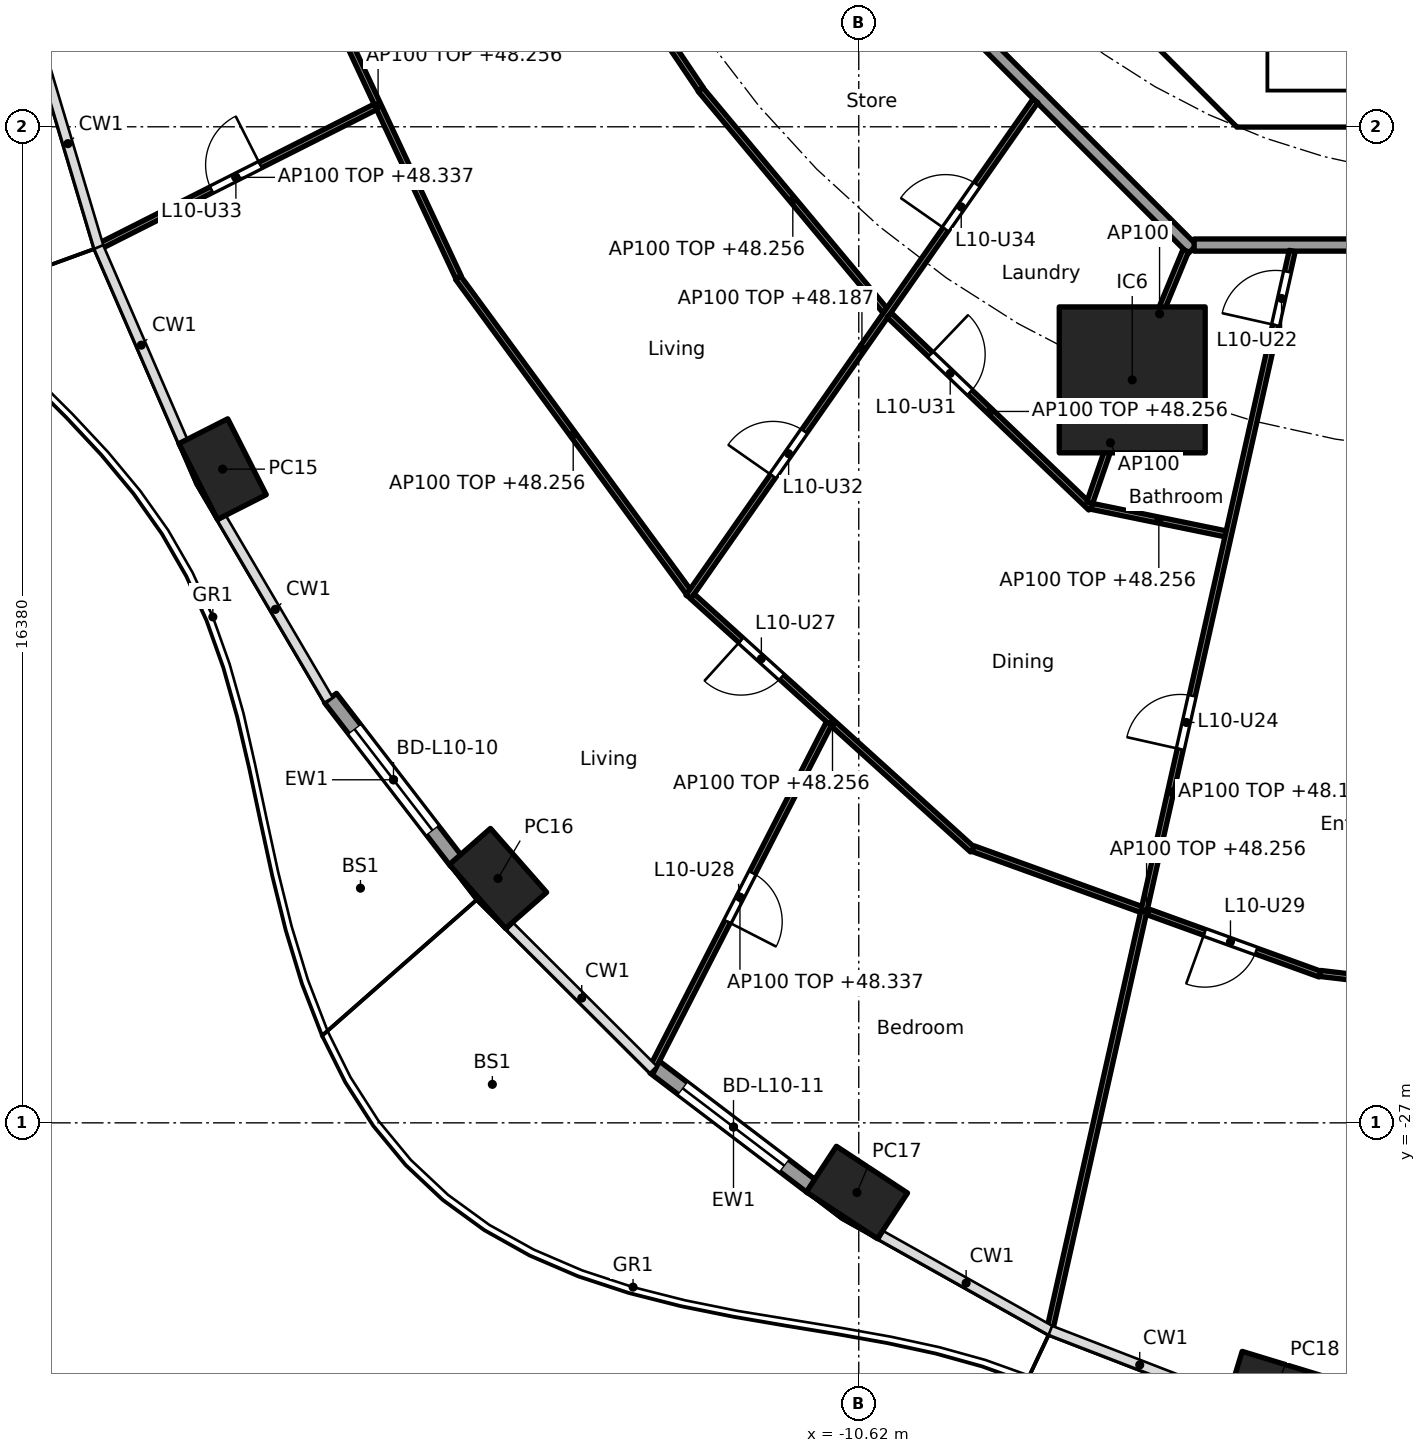
"""IFC4 building model, lengths in metres.
Left out: names, types, materials, properties, quantities, classifications, styles, units other than length and angle.
Written with IfcOpenShell. Run it as: python <this file> out.ifc"""

import sys

from ifc_helpers import new_model, si_unit, direction, frame, frame_2d, origin, origin_2d, place, context, subcontext, project, spatial, polyline, rectangle, hollow_rectangle, outline, extrude, element, fill, save


model = new_model("IFC4")
c1 = context("Model", 3, precision=1e-05, world=origin(), true_north=direction((0.0, 1.0)))
c2 = subcontext(c1, "Body", "Model", "MODEL_VIEW")
j1 = project(units=[si_unit("LENGTHUNIT", "METRE"), si_unit("PLANEANGLEUNIT", "RADIAN")], contexts=[c1])
p1 = place(None, origin())
s1 = spatial("IfcSite", under=j1, at=p1, CompositionType="ELEMENT")
p2 = place(p1, origin())
s2 = spatial("IfcBuilding", under=s1, at=p2, CompositionType="ELEMENT")
p3 = place(p2, frame((0.0, 0.0, 45.5)))
s3 = spatial("IfcBuildingStorey", under=s2, at=p3, CompositionType="ELEMENT", Elevation=45.5)
for number, where, z_axis, x_axis in (
    (1, (-21.082, -16.25, 0.0), (0.0, 0.0, 1.0), (0.452, -0.892, 0.0)),
    (2, (-16.552, -22.981, 0.0), (0.0, 0.0, 1.0), (0.66, -0.751, 0.0)),
    (3, (-10.65, -28.146, 0.0), (0.0, 0.0, 1.0), (0.836, -0.549, 0.0)),
    (4, (-3.776, -31.393, 0.0), (0.0, 0.0, 1.0), (0.957, -0.292, 0.0)),
):
    element("IfcColumn", number, at=place(p3, frame(where, z_axis=z_axis, x_axis=x_axis)), inside=s3, PredefinedType="COLUMN", context=c2, shape_type="SweptSolid", body=[
        extrude(hollow_rectangle(XDim=1.4, YDim=0.9, WallThickness=0.05, at=origin_2d()), origin(), (0.0, 0.0, 1.0), 3.7),
    ])
p4 = place(p3, frame((-6.123, -14.782, 0.0), z_axis=(0.0, 0.0, 1.0), x_axis=(1.0, 0.0, 0.0)))
e5 = element("IfcColumn", 5, at=p4, inside=s3, PredefinedType="COLUMN", context=c2, shape_type="SweptSolid", body=[
    extrude(rectangle(XDim=2.4, YDim=2.4, at=origin_2d()), origin(), (0.0, 0.0, 1.0), 3.7),
])
p5 = place(p3, frame((-17.234, -22.704, 0.0), z_axis=(0.0, 0.0, 1.0), x_axis=(-0.610457147657, 0.792049285635, 0.0)))
e6 = element("IfcWall", 6, at=p5, inside=s3, PredefinedType="SOLIDWALL", context=c2, shape_type="SweptSolid", body=[
    extrude(rectangle(XDim=3.397, YDim=0.25, at=frame_2d((1.699, 0.0))), origin(), (0.0, 0.0, 1.0), 3.44),
])
p6 = place(p5, frame((0.649, 0.0, 0.0)))
e7 = element("IfcOpeningElement", 7, at=p6, cuts=e6, PredefinedType="OPENING", context=c2, shape_type="SweptSolid", body=[
    extrude(rectangle(XDim=2.1, YDim=2.4, at=frame_2d((1.05, 1.2))), frame((0.0, 0.135, 0.0), z_axis=(0.0, -1.0, 0.0), x_axis=(1.0, 0.0, 0.0)), (0.0, 0.0, 1.0), 0.27),
])
p7 = place(p3, frame((-11.382, -28.056, 0.0), z_axis=(0.0, 0.0, 1.0), x_axis=(-0.796022293214, 0.605267303517, 0.0)))
e8 = element("IfcWall", 8, at=p7, inside=s3, PredefinedType="SOLIDWALL", context=c2, shape_type="SweptSolid", body=[
    extrude(rectangle(XDim=3.262, YDim=0.25, at=frame_2d((1.631, 0.0))), origin(), (0.0, 0.0, 1.0), 3.44),
])
p8 = place(p7, frame((0.581, 0.0, 0.0)))
e9 = element("IfcOpeningElement", 9, at=p8, cuts=e8, PredefinedType="OPENING", context=c2, shape_type="SweptSolid", body=[
    extrude(rectangle(XDim=2.1, YDim=2.4, at=frame_2d((1.05, 1.2))), frame((0.0, 0.135, 0.0), z_axis=(0.0, -1.0, 0.0), x_axis=(1.0, 0.0, 0.0)), (0.0, 0.0, 1.0), 0.27),
])
p9 = place(p3, frame((-9.988, -4.613, 0.0), z_axis=(0.0, 0.0, 1.0), x_axis=(0.707106781187, -0.707106781187, 0.0)))
e10 = element("IfcWall", 10, at=p9, inside=s3, PredefinedType="SHEAR", context=c2, shape_type="SweptSolid", body=[
    extrude(rectangle(XDim=7.602, YDim=0.6, at=frame_2d((3.801, 0.0))), origin(), (0.0, 0.0, 1.0), 3.44),
])
p10 = place(p9, frame((6.151, 0.0, 0.0)))
e11 = element("IfcOpeningElement", 11, at=p10, cuts=e10, PredefinedType="OPENING", context=c2, shape_type="SweptSolid", body=[
    extrude(rectangle(XDim=1.1, YDim=2.1, at=frame_2d((0.55, 1.05))), frame((0.0, 0.31, 0.0), z_axis=(0.0, -1.0, 0.0), x_axis=(1.0, 0.0, 0.0)), (0.0, 0.0, 1.0), 0.62),
])
p11 = place(p3, origin())
e12 = element("IfcWall", 12, at=p11, inside=s3, PredefinedType="SHEAR", context=c2, shape_type="SweptSolid", body=[
    extrude(outline(polyline([(-4.152, -10.025), (4.152, -10.025), (4.401, -9.776), (4.825, -10.2), (4.401, -10.625), (-4.401, -10.625), (-4.825, -10.2), (-4.401, -9.776), (-4.152, -10.025)])), origin(), (0.0, 0.0, 1.0), 3.44),
])
p12 = place(p3, origin())
e13 = element("IfcWall", 13, at=p12, inside=s3, PredefinedType="SOLIDWALL", context=c2, shape_type="SweptSolid", body=[
    extrude(outline(polyline([(-3.9, -10.025), (-4.1, -10.025), (-4.1, -7.025), (-3.9, -7.025), (-3.9, -10.025)])), origin(), (0.0, 0.0, 1.0), 3.44),
])
p13 = place(p3, frame((-12.635, -5.134, 0.0), z_axis=(0.0, 0.0, 1.0), x_axis=(0.707106781187, -0.707106781187, 0.0)))
e14 = element("IfcWall", 14, at=p13, inside=s3, PredefinedType="PARTITIONING", context=c2, shape_type="SweptSolid", body=[
    extrude(rectangle(XDim=10.609, YDim=0.2, at=frame_2d((5.305, 0.0))), origin(), (0.0, 0.0, 1.0), 3.44),
])
p14 = place(p3, frame((-5.104, -12.565, 0.0), z_axis=(0.0, 0.0, 1.0), x_axis=(1.0, 0.0, 0.0)))
e15 = element("IfcWall", 15, at=p14, inside=s3, PredefinedType="PARTITIONING", context=c2, shape_type="SweptSolid", body=[
    extrude(rectangle(XDim=10.409, YDim=0.2, at=frame_2d((5.205, 0.0))), origin(), (0.0, 0.0, 1.0), 3.44),
])
p15 = place(p14, frame((2.87, 0.0, 0.0)))
e16 = element("IfcOpeningElement", 16, at=p15, cuts=e15, PredefinedType="OPENING", context=c2, shape_type="SweptSolid", body=[
    extrude(rectangle(XDim=1.0, YDim=2.1, at=frame_2d((0.5, 1.05))), frame((0.0, 0.11, 0.0), z_axis=(0.0, -1.0, 0.0), x_axis=(1.0, 0.0, 0.0)), (0.0, 0.0, 1.0), 0.22),
])
p16 = place(p3, frame((-15.655, -6.391, 0.0), z_axis=(0.0, 0.0, 1.0), x_axis=(0.559126445155, -0.82908239538, 0.0)))
e17 = element("IfcWall", 17, at=p16, inside=s3, PredefinedType="PARTITIONING", context=c2, shape_type="SweptSolid", body=[
    extrude(rectangle(XDim=4.358, YDim=0.1, at=frame_2d((2.179, 0.0))), origin(), (0.0, 0.0, 1.0), 3.44),
])
p17 = place(p3, frame((-19.847, -7.445, 0.0), z_axis=(0.0, 0.0, 1.0), x_axis=(0.423892287987, -0.905712607942, 0.0)))
e18 = element("IfcWall", 18, at=p17, inside=s3, PredefinedType="PARTITIONING", context=c2, shape_type="SweptSolid", body=[
    extrude(rectangle(XDim=6.238, YDim=0.1, at=frame_2d((3.119, 0.0))), origin(), (0.0, 0.0, 1.0), 2.756),
])
p18 = place(p3, frame((-18.569, -10.292, 0.0), z_axis=(0.0, 0.0, 1.0), x_axis=(-0.892519131357, -0.451009534446, 0.0)))
e19 = element("IfcWall", 19, at=p18, inside=s3, PredefinedType="PARTITIONING", context=c2, shape_type="SweptSolid", body=[
    extrude(rectangle(XDim=5.14, YDim=0.1, at=frame_2d((2.57, 0.0))), origin(), (0.0, 0.0, 1.0), 2.837),
])
p19 = place(p18, frame((2.12, 0.0, 0.0)))
e20 = element("IfcOpeningElement", 20, at=p19, cuts=e19, PredefinedType="OPENING", context=c2, shape_type="SweptSolid", body=[
    extrude(rectangle(XDim=0.9, YDim=2.1, at=frame_2d((0.45, 1.05))), frame((0.0, 0.06, 0.0), z_axis=(0.0, -1.0, 0.0), x_axis=(1.0, 0.0, 0.0)), (0.0, 0.0, 1.0), 0.12),
])
p20 = place(p3, frame((-13.222, -10.007, 0.0), z_axis=(0.0, 0.0, 1.0), x_axis=(0.640807748916, -0.767701393075, 0.0)))
e21 = element("IfcWall", 21, at=p20, inside=s3, PredefinedType="PARTITIONING", context=c2, shape_type="SweptSolid", body=[
    extrude(rectangle(XDim=4.737, YDim=0.1, at=frame_2d((2.368, 0.0))), origin(), (0.0, 0.0, 1.0), 2.756),
])
p21 = place(p3, frame((-17.211, -13.1, 0.0), z_axis=(0.0, 0.0, 1.0), x_axis=(0.591206785834, -0.806520016109, 0.0)))
e22 = element("IfcWall", 22, at=p21, inside=s3, PredefinedType="PARTITIONING", context=c2, shape_type="SweptSolid", body=[
    extrude(rectangle(XDim=6.41, YDim=0.1, at=frame_2d((3.205, 0.0))), origin(), (0.0, 0.0, 1.0), 2.756),
])
p22 = place(p3, frame((-7.715, -10.193, 0.0), z_axis=(0.0, 0.0, 1.0), x_axis=(-0.573126502256, -0.819466907454, 0.0)))
e23 = element("IfcWall", 23, at=p22, inside=s3, PredefinedType="PARTITIONING", context=c2, shape_type="SweptSolid", body=[
    extrude(rectangle(XDim=9.954, YDim=0.1, at=frame_2d((4.977, 0.0))), origin(), (0.0, 0.0, 1.0), 2.687),
])
p23 = place(p22, frame((6.631, 0.0, 0.0)))
e24 = element("IfcOpeningElement", 24, at=p23, cuts=e23, PredefinedType="OPENING", context=c2, shape_type="SweptSolid", body=[
    extrude(rectangle(XDim=0.9, YDim=2.1, at=frame_2d((0.45, 1.05))), frame((0.0, 0.06, 0.0), z_axis=(0.0, -1.0, 0.0), x_axis=(1.0, 0.0, 0.0)), (0.0, 0.0, 1.0), 0.12),
])
p24 = place(p22, frame((1.678, 0.0, 0.0)))
e25 = element("IfcOpeningElement", 25, at=p24, cuts=e23, PredefinedType="OPENING", context=c2, shape_type="SweptSolid", body=[
    extrude(rectangle(XDim=0.9, YDim=2.1, at=frame_2d((0.45, 1.05))), frame((0.0, 0.06, 0.0), z_axis=(0.0, -1.0, 0.0), x_axis=(1.0, 0.0, 0.0)), (0.0, 0.0, 1.0), 0.12),
])
p25 = place(p3, frame((-10.119, -13.716, 0.0), z_axis=(0.0, 0.0, 1.0), x_axis=(0.722763212502, -0.69109575216, 0.0)))
e26 = element("IfcWall", 26, at=p25, inside=s3, PredefinedType="PARTITIONING", context=c2, shape_type="SweptSolid", body=[
    extrude(rectangle(XDim=4.587, YDim=0.1, at=frame_2d((2.293, 0.0))), origin(), (0.0, 0.0, 1.0), 2.756),
])
p26 = place(p25, frame((0.938, 0.0, 0.0)))
e27 = element("IfcOpeningElement", 27, at=p26, cuts=e26, PredefinedType="OPENING", context=c2, shape_type="SweptSolid", body=[
    extrude(rectangle(XDim=0.9, YDim=2.1, at=frame_2d((0.45, 1.05))), frame((0.0, 0.06, 0.0), z_axis=(0.0, -1.0, 0.0), x_axis=(1.0, 0.0, 0.0)), (0.0, 0.0, 1.0), 0.12),
])
p27 = place(p3, frame((-13.355, -18.343, 0.0), z_axis=(0.0, 0.0, 1.0), x_axis=(0.741720189244, -0.670709445936, 0.0)))
e28 = element("IfcWall", 28, at=p27, inside=s3, PredefinedType="PARTITIONING", context=c2, shape_type="SweptSolid", body=[
    extrude(rectangle(XDim=6.209, YDim=0.1, at=frame_2d((3.104, 0.0))), origin(), (0.0, 0.0, 1.0), 2.756),
])
p28 = place(p27, frame((1.077, 0.0, 0.0)))
e29 = element("IfcOpeningElement", 29, at=p28, cuts=e28, PredefinedType="OPENING", context=c2, shape_type="SweptSolid", body=[
    extrude(rectangle(XDim=0.9, YDim=2.1, at=frame_2d((0.45, 1.05))), frame((0.0, 0.06, 0.0), z_axis=(0.0, -1.0, 0.0), x_axis=(1.0, 0.0, 0.0)), (0.0, 0.0, 1.0), 0.12),
])
p29 = place(p3, frame((-11.112, -20.437, 0.0), z_axis=(0.0, 0.0, 1.0), x_axis=(-0.455901610863, -0.890030179945, 0.0)))
e30 = element("IfcWall", 30, at=p29, inside=s3, PredefinedType="PARTITIONING", context=c2, shape_type="SweptSolid", body=[
    extrude(rectangle(XDim=6.414, YDim=0.1, at=frame_2d((3.207, 0.0))), origin(), (0.0, 0.0, 1.0), 2.837),
])
p30 = place(p29, frame((2.757, 0.0, 0.0)))
e31 = element("IfcOpeningElement", 31, at=p30, cuts=e30, PredefinedType="OPENING", context=c2, shape_type="SweptSolid", body=[
    extrude(rectangle(XDim=0.9, YDim=2.1, at=frame_2d((0.45, 1.05))), frame((0.0, 0.06, 0.0), z_axis=(0.0, -1.0, 0.0), x_axis=(1.0, 0.0, 0.0)), (0.0, 0.0, 1.0), 0.12),
])
p31 = place(p3, frame((-5.243, -12.657, 0.0), z_axis=(0.0, 0.0, 1.0), x_axis=(-0.382719158442, -0.923864733477, 0.0)))
e32 = element("IfcWall", 32, at=p31, inside=s3, PredefinedType="PARTITIONING", context=c2, shape_type="SweptSolid", body=[
    extrude(rectangle(XDim=2.25, YDim=0.1, at=frame_2d((1.125, 0.0))), origin(), (0.0, 0.0, 1.0), 3.44),
])
p32 = place(p3, frame((-6.139, -14.83, 0.0), z_axis=(0.0, 0.0, 1.0), x_axis=(-0.327246993321, -0.944938836837, 0.0)))
e33 = element("IfcWall", 33, at=p32, inside=s3, PredefinedType="PARTITIONING", context=c2, shape_type="SweptSolid", body=[
    extrude(rectangle(XDim=2.09, YDim=0.1, at=frame_2d((1.045, 0.0))), origin(), (0.0, 0.0, 1.0), 3.44),
])
p33 = place(p3, frame((-6.791, -16.862, 0.0), z_axis=(0.0, 0.0, 1.0), x_axis=(0.979581941859, -0.201045316246, 0.0)))
e34 = element("IfcWall", 34, at=p33, inside=s3, PredefinedType="PARTITIONING", context=c2, shape_type="SweptSolid", body=[
    extrude(rectangle(XDim=2.256, YDim=0.1, at=frame_2d((1.128, 0.0))), origin(), (0.0, 0.0, 1.0), 2.756),
])
p34 = place(p3, frame((-8.739, -22.491, 0.0), z_axis=(0.0, 0.0, 1.0), x_axis=(0.940401691072, -0.340065669288, 0.0)))
e35 = element("IfcWall", 35, at=p34, inside=s3, PredefinedType="PARTITIONING", context=c2, shape_type="SweptSolid", body=[
    extrude(rectangle(XDim=6.067, YDim=0.1, at=frame_2d((3.034, 0.0))), origin(), (0.0, 0.0, 1.0), 2.756),
])
p35 = place(p34, frame((4.05, 0.0, 0.0)))
e36 = element("IfcOpeningElement", 36, at=p35, cuts=e35, PredefinedType="OPENING", context=c2, shape_type="SweptSolid", body=[
    extrude(rectangle(XDim=0.9, YDim=2.1, at=frame_2d((0.45, 1.05))), frame((0.0, 0.06, 0.0), z_axis=(0.0, -1.0, 0.0), x_axis=(1.0, 0.0, 0.0)), (0.0, 0.0, 1.0), 0.12),
])
p36 = place(p3, frame((-3.492, -12.662, 0.0), z_axis=(0.0, 0.0, 1.0), x_axis=(-0.219268088006, -0.975664648115, 0.0)))
e37 = element("IfcWall", 37, at=p36, inside=s3, PredefinedType="PARTITIONING", context=c2, shape_type="SweptSolid", body=[
    extrude(rectangle(XDim=18.23, YDim=0.1, at=frame_2d((9.115, 0.0))), origin(), (0.0, 0.0, 1.0), 2.687),
])
p37 = place(p36, frame((0.35, 0.0, 0.0)))
e38 = element("IfcOpeningElement", 38, at=p37, cuts=e37, PredefinedType="OPENING", context=c2, shape_type="SweptSolid", body=[
    extrude(rectangle(XDim=0.9, YDim=2.1, at=frame_2d((0.45, 1.05))), frame((0.0, 0.06, 0.0), z_axis=(0.0, -1.0, 0.0), x_axis=(1.0, 0.0, 0.0)), (0.0, 0.0, 1.0), 0.12),
])
p38 = place(p36, frame((7.497, 0.0, 0.0)))
e39 = element("IfcOpeningElement", 39, at=p38, cuts=e37, PredefinedType="OPENING", context=c2, shape_type="SweptSolid", body=[
    extrude(rectangle(XDim=0.9, YDim=2.1, at=frame_2d((0.45, 1.05))), frame((0.0, 0.06, 0.0), z_axis=(0.0, -1.0, 0.0), x_axis=(1.0, 0.0, 0.0)), (0.0, 0.0, 1.0), 0.12),
])
p39 = place(p3, frame((-3.031, -24.543, 0.0), z_axis=(0.0, 0.0, 1.0), x_axis=(0.993255612046, -0.115945198862, 0.0)))
e40 = element("IfcWall", 40, at=p39, inside=s3, PredefinedType="PARTITIONING", context=c2, shape_type="SweptSolid", body=[
    extrude(rectangle(XDim=5.913, YDim=0.1, at=frame_2d((2.956, 0.0))), origin(), (0.0, 0.0, 1.0), 2.756),
])
p40 = place(p6, origin())
e41 = element("IfcDoor", 41, at=p40, inside=s3, OperationType="SLIDING_TO_LEFT", PredefinedType="DOOR", context=c2, shape_type="SweptSolid", body=[
    extrude(rectangle(XDim=2.1, YDim=2.4, at=frame_2d((1.05, 1.2))), frame((0.0, 0.025, 0.0), z_axis=(0.0, -1.0, 0.0), x_axis=(1.0, 0.0, 0.0)), (0.0, 0.0, 1.0), 0.05),
])
fill(e7, e41)
p41 = place(p8, origin())
e42 = element("IfcDoor", 42, at=p41, inside=s3, OperationType="SLIDING_TO_LEFT", PredefinedType="DOOR", context=c2, shape_type="SweptSolid", body=[
    extrude(rectangle(XDim=2.1, YDim=2.4, at=frame_2d((1.05, 1.2))), frame((0.0, 0.025, 0.0), z_axis=(0.0, -1.0, 0.0), x_axis=(1.0, 0.0, 0.0)), (0.0, 0.0, 1.0), 0.05),
])
fill(e9, e42)
p42 = place(p10, origin())
e43 = element("IfcDoor", 43, at=p42, inside=s3, OperationType="SINGLE_SWING_RIGHT", PredefinedType="DOOR", context=c2, shape_type="SweptSolid", body=[
    extrude(rectangle(XDim=1.1, YDim=2.1, at=frame_2d((0.55, 1.05))), frame((0.0, 0.025, 0.0), z_axis=(0.0, -1.0, 0.0), x_axis=(1.0, 0.0, 0.0)), (0.0, 0.0, 1.0), 0.05),
])
fill(e11, e43)
p43 = place(p37, frame((0.9, 0.0, 0.0), x_axis=(-1.0, 0.0, 0.0)))
e44 = element("IfcDoor", 44, at=p43, inside=s3, OperationType="SINGLE_SWING_LEFT", PredefinedType="DOOR", context=c2, shape_type="SweptSolid", body=[
    extrude(rectangle(XDim=0.9, YDim=2.1, at=frame_2d((0.45, 1.05))), frame((0.0, 0.025, 0.0), z_axis=(0.0, -1.0, 0.0), x_axis=(1.0, 0.0, 0.0)), (0.0, 0.0, 1.0), 0.05),
])
fill(e38, e44)
p44 = place(p38, frame((0.9, 0.0, 0.0), x_axis=(-1.0, 0.0, 0.0)))
e45 = element("IfcDoor", 45, at=p44, inside=s3, OperationType="SINGLE_SWING_LEFT", PredefinedType="DOOR", context=c2, shape_type="SweptSolid", body=[
    extrude(rectangle(XDim=0.9, YDim=2.1, at=frame_2d((0.45, 1.05))), frame((0.0, 0.025, 0.0), z_axis=(0.0, -1.0, 0.0), x_axis=(1.0, 0.0, 0.0)), (0.0, 0.0, 1.0), 0.05),
])
fill(e39, e45)
p45 = place(p28, frame((0.9, 0.0, 0.0), x_axis=(-1.0, 0.0, 0.0)))
e46 = element("IfcDoor", 46, at=p45, inside=s3, OperationType="SINGLE_SWING_RIGHT", PredefinedType="DOOR", context=c2, shape_type="SweptSolid", body=[
    extrude(rectangle(XDim=0.9, YDim=2.1, at=frame_2d((0.45, 1.05))), frame((0.0, 0.025, 0.0), z_axis=(0.0, -1.0, 0.0), x_axis=(1.0, 0.0, 0.0)), (0.0, 0.0, 1.0), 0.05),
])
fill(e29, e46)
p46 = place(p30, origin())
e47 = element("IfcDoor", 47, at=p46, inside=s3, OperationType="SINGLE_SWING_RIGHT", PredefinedType="DOOR", context=c2, shape_type="SweptSolid", body=[
    extrude(rectangle(XDim=0.9, YDim=2.1, at=frame_2d((0.45, 1.05))), frame((0.0, 0.025, 0.0), z_axis=(0.0, -1.0, 0.0), x_axis=(1.0, 0.0, 0.0)), (0.0, 0.0, 1.0), 0.05),
])
fill(e31, e47)
p47 = place(p35, frame((0.9, 0.0, 0.0), x_axis=(-1.0, 0.0, 0.0)))
e48 = element("IfcDoor", 48, at=p47, inside=s3, OperationType="SINGLE_SWING_RIGHT", PredefinedType="DOOR", context=c2, shape_type="SweptSolid", body=[
    extrude(rectangle(XDim=0.9, YDim=2.1, at=frame_2d((0.45, 1.05))), frame((0.0, 0.025, 0.0), z_axis=(0.0, -1.0, 0.0), x_axis=(1.0, 0.0, 0.0)), (0.0, 0.0, 1.0), 0.05),
])
fill(e36, e48)
p48 = place(p26, origin())
e49 = element("IfcDoor", 49, at=p48, inside=s3, OperationType="SINGLE_SWING_LEFT", PredefinedType="DOOR", context=c2, shape_type="SweptSolid", body=[
    extrude(rectangle(XDim=0.9, YDim=2.1, at=frame_2d((0.45, 1.05))), frame((0.0, 0.025, 0.0), z_axis=(0.0, -1.0, 0.0), x_axis=(1.0, 0.0, 0.0)), (0.0, 0.0, 1.0), 0.05),
])
fill(e27, e49)
p49 = place(p23, frame((0.9, 0.0, 0.0), x_axis=(-1.0, 0.0, 0.0)))
e50 = element("IfcDoor", 50, at=p49, inside=s3, OperationType="SINGLE_SWING_LEFT", PredefinedType="DOOR", context=c2, shape_type="SweptSolid", body=[
    extrude(rectangle(XDim=0.9, YDim=2.1, at=frame_2d((0.45, 1.05))), frame((0.0, 0.025, 0.0), z_axis=(0.0, -1.0, 0.0), x_axis=(1.0, 0.0, 0.0)), (0.0, 0.0, 1.0), 0.05),
])
fill(e24, e50)
p50 = place(p19, frame((0.9, 0.0, 0.0), x_axis=(-1.0, 0.0, 0.0)))
e51 = element("IfcDoor", 51, at=p50, inside=s3, OperationType="SINGLE_SWING_RIGHT", PredefinedType="DOOR", context=c2, shape_type="SweptSolid", body=[
    extrude(rectangle(XDim=0.9, YDim=2.1, at=frame_2d((0.45, 1.05))), frame((0.0, 0.025, 0.0), z_axis=(0.0, -1.0, 0.0), x_axis=(1.0, 0.0, 0.0)), (0.0, 0.0, 1.0), 0.05),
])
fill(e20, e51)
p51 = place(p24, frame((0.9, 0.0, 0.0), x_axis=(-1.0, 0.0, 0.0)))
e52 = element("IfcDoor", 52, at=p51, inside=s3, OperationType="SINGLE_SWING_LEFT", PredefinedType="DOOR", context=c2, shape_type="SweptSolid", body=[
    extrude(rectangle(XDim=0.9, YDim=2.1, at=frame_2d((0.45, 1.05))), frame((0.0, 0.025, 0.0), z_axis=(0.0, -1.0, 0.0), x_axis=(1.0, 0.0, 0.0)), (0.0, 0.0, 1.0), 0.05),
])
fill(e25, e52)
save(model, sys.argv[1])
